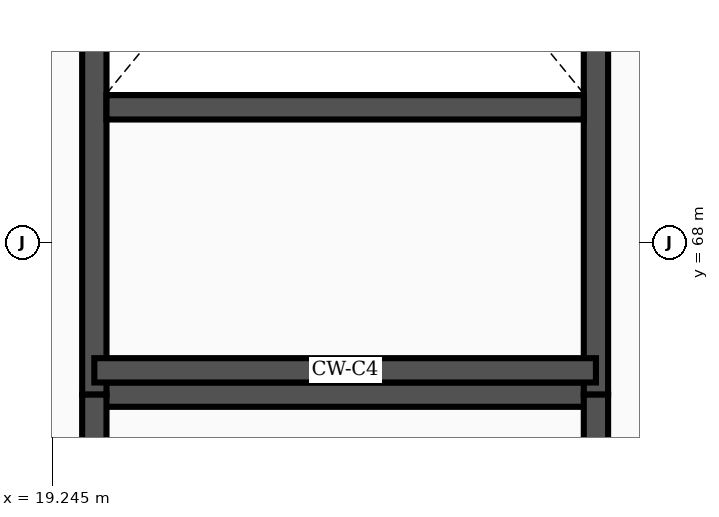
"""IFC4 building model, lengths in metres.
Left out: names, types, materials, properties, quantities, classifications, styles, units other than length and angle.
Written with IfcOpenShell. Run it as: python <this file> out.ifc"""

import sys

from ifc_helpers import new_model, si_unit, direction, frame, frame_2d, origin, place, context, subcontext, project, spatial, rectangle, extrude, element, save


model = new_model("IFC4")
c1 = context("Model", 3, precision=1e-05, world=origin(), true_north=direction((0.0, 1.0)))
c2 = subcontext(c1, "Body", "Model", "MODEL_VIEW")
j1 = project(units=[si_unit("LENGTHUNIT", "METRE"), si_unit("PLANEANGLEUNIT", "RADIAN")], contexts=[c1])
p1 = place(None, origin())
s1 = spatial("IfcSite", under=j1, at=p1, CompositionType="ELEMENT")
p2 = place(p1, origin())
s2 = spatial("IfcBuilding", under=s1, at=p2, CompositionType="ELEMENT")
p3 = place(p2, frame((0.0, 0.0, 16.8)))
s3 = spatial("IfcBuildingStorey", under=s2, at=p3, CompositionType="ELEMENT", Elevation=16.8)
p4 = place(p3, frame((19.8, 66.0, 0.0), z_axis=(0.0, 0.0, 1.0), x_axis=(1.0, 0.0, 0.0)))
e1 = element("IfcWall", 1, at=p4, inside=s3, PredefinedType="SHEAR", context=c2, shape_type="SweptSolid", body=[
    extrude(rectangle(XDim=6.6, YDim=0.32, at=frame_2d((3.3, 0.0))), origin(), (0.0, 0.0, 1.0), 4.555),
])
p5 = place(p3, frame((19.8, 66.0, 0.0), z_axis=(0.0, 0.0, 1.0), x_axis=(0.0, 1.0, 0.0)))
e2 = element("IfcWall", 2, at=p5, inside=s3, PredefinedType="SHEAR", context=c2, shape_type="SweptSolid", body=[
    extrude(rectangle(XDim=14.6, YDim=0.32, at=frame_2d((7.3, 0.0))), origin(), (0.0, 0.0, 1.0), 4.555),
])
p6 = place(p5, frame((11.65, 0.0, 0.0)))
e3 = element("IfcOpeningElement", 3, at=p6, cuts=e2, PredefinedType="OPENING", context=c2, shape_type="SweptSolid", body=[
    extrude(rectangle(XDim=2.4, YDim=2.25, at=frame_2d((1.2, 1.125))), frame((0.0, 0.172, 0.0), z_axis=(0.0, -1.0, 0.0), x_axis=(1.0, 0.0, 0.0)), (0.0, 0.0, 1.0), 0.344),
])
p7 = place(p3, frame((26.4, 66.0, 0.0), z_axis=(0.0, 0.0, 1.0), x_axis=(0.0, 1.0, 0.0)))
e4 = element("IfcWall", 4, at=p7, inside=s3, PredefinedType="SHEAR", context=c2, shape_type="SweptSolid", body=[
    extrude(rectangle(XDim=14.6, YDim=0.32, at=frame_2d((7.3, 0.0))), origin(), (0.0, 0.0, 1.0), 4.555),
])
p8 = place(p3, frame((19.96, 69.78, 0.0), z_axis=(0.0, 0.0, 1.0), x_axis=(1.0, 0.0, 0.0)))
e5 = element("IfcWall", 5, at=p8, inside=s3, PredefinedType="SHEAR", context=c2, shape_type="SweptSolid", body=[
    extrude(rectangle(XDim=6.28, YDim=0.32, at=frame_2d((3.14, 0.0))), origin(), (0.0, 0.0, 1.0), 4.555),
])
p9 = place(p3, frame((19.8, 66.32, 0.0), z_axis=(0.0, 0.0, 1.0), x_axis=(1.0, 0.0, 0.0)))
e6 = element("IfcWall", 6, at=p9, inside=s3, PredefinedType="SHEAR", context=c2, shape_type="SweptSolid", body=[
    extrude(rectangle(XDim=6.6, YDim=0.32, at=frame_2d((3.3, 0.0))), origin(), (0.0, 0.0, 1.0), 4.555),
])
p10 = place(p3, frame((19.8, 54.0, 0.0), z_axis=(0.0, 0.0, 1.0), x_axis=(0.0, 1.0, 0.0)))
e7 = element("IfcWall", 7, at=p10, inside=s3, PredefinedType="SHEAR", context=c2, shape_type="SweptSolid", body=[
    extrude(rectangle(XDim=12.0, YDim=0.32, at=frame_2d((6.0, 0.0))), origin(), (0.0, 0.0, 1.0), 4.555),
])
p11 = place(p10, frame((0.55, 0.0, 0.0)))
e8 = element("IfcOpeningElement", 8, at=p11, cuts=e7, PredefinedType="OPENING", context=c2, shape_type="SweptSolid", body=[
    extrude(rectangle(XDim=2.4, YDim=2.25, at=frame_2d((1.2, 1.125))), frame((0.0, 0.172, 0.0), z_axis=(0.0, -1.0, 0.0), x_axis=(1.0, 0.0, 0.0)), (0.0, 0.0, 1.0), 0.344),
])
p12 = place(p3, frame((26.4, 54.0, 0.0), z_axis=(0.0, 0.0, 1.0), x_axis=(0.0, 1.0, 0.0)))
e9 = element("IfcWall", 9, at=p12, inside=s3, PredefinedType="SHEAR", context=c2, shape_type="SweptSolid", body=[
    extrude(rectangle(XDim=12.0, YDim=0.32, at=frame_2d((6.0, 0.0))), origin(), (0.0, 0.0, 1.0), 4.555),
])
save(model, sys.argv[1])
